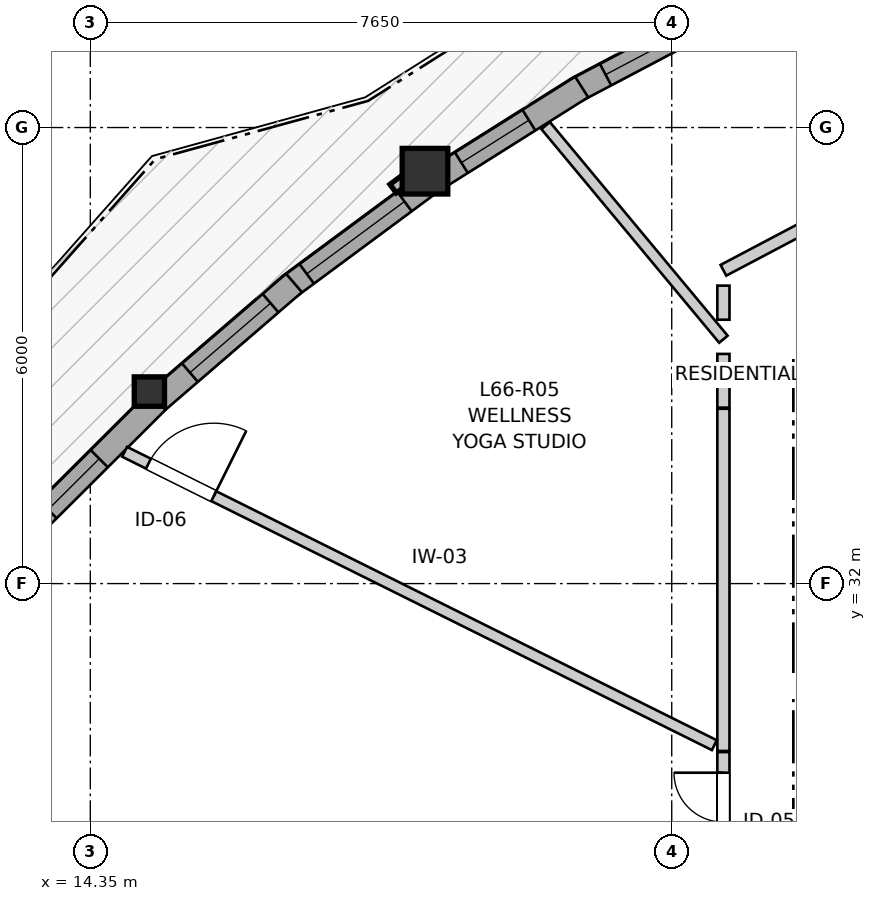
"""IFC4 building model, lengths in metres.
Left out: names, types, materials, properties, quantities, classifications, styles, units other than length and angle.
Written with IfcOpenShell. Run it as: python <this file> out.ifc"""

import sys

from ifc_helpers import new_model, si_unit, direction, frame, frame_2d, origin, origin_2d, place, context, subcontext, project, spatial, rectangle, i_section, extrude, source, transform, mapped, element, fill, save


model = new_model("IFC4")
c1 = context("Model", 3, precision=1e-05, world=origin(), true_north=direction((0.0, 1.0)))
c2 = subcontext(c1, "Body", "Model", "MODEL_VIEW")
j1 = project(units=[si_unit("LENGTHUNIT", "METRE"), si_unit("PLANEANGLEUNIT", "RADIAN")], contexts=[c1])
p1 = place(None, origin())
s1 = spatial("IfcSite", under=j1, at=p1, CompositionType="ELEMENT")
p2 = place(p1, origin())
s2 = spatial("IfcBuilding", under=s1, at=p2, CompositionType="ELEMENT")
p3 = place(p2, frame((0.0, 0.0, 221.2)))
s3 = spatial("IfcBuildingStorey", under=s2, at=p3, CompositionType="ELEMENT", Elevation=221.2)
m1 = source(origin(), c2, "Body", "SweptSolid", [
    extrude(rectangle(XDim=0.6, YDim=0.6, at=origin_2d()), origin(), (0.0, 0.0, 1.0), 2.96),
])
p4 = place(p3, frame((18.753, 37.426, 0.0), z_axis=(0.0, 0.0, 1.0), x_axis=(1.0, 0.0, 0.0)))
e1 = element("IfcColumn", 1, at=p4, inside=s3, PredefinedType="COLUMN", context=c2, shape_type="MappedRepresentation", body=[
    mapped(m1, transform((0.0, 0.0, 0.0), x_axis=(1.0, 0.0, 0.0), y_axis=(0.0, 1.0, 0.0), z_axis=(0.0, 0.0, 1.0), scale=1.0)),
])
m2 = source(origin(), c2, "Body", "SweptSolid", [
    extrude(i_section(OverallWidth=0.398, OverallDepth=0.387, WebThickness=0.019, FlangeThickness=0.03, FilletRadius=0.015, at=origin_2d()), origin(), (0.0, 0.0, 1.0), 2.96),
])
p5 = place(p3, frame((15.127, 34.526, 0.0), z_axis=(0.0, 0.0, 1.0), x_axis=(1.0, 0.0, 0.0)))
e2 = element("IfcColumn", 2, at=p5, inside=s3, PredefinedType="PILASTER", context=c2, shape_type="MappedRepresentation", body=[
    mapped(m2, transform((0.0, 0.0, 0.0), x_axis=(1.0, 0.0, 0.0), y_axis=(0.0, 1.0, 0.0), z_axis=(0.0, 0.0, 1.0), scale=1.0)),
])
p6 = place(p3, frame((22.785, 39.57, 0.0), z_axis=(0.0, 0.0, 1.0), x_axis=(-0.884379914657, -0.466767786541, 0.0)))
e3 = element("IfcWall", 3, at=p6, inside=s3, PredefinedType="SOLIDWALL", context=c2, shape_type="SweptSolid", body=[
    extrude(rectangle(XDim=2.314, YDim=0.32, at=frame_2d((1.157, 0.0))), origin(), (0.0, 0.0, 1.0), 2.58),
])
p7 = place(p6, frame((0.422, 0.0, 0.82)))
e4 = element("IfcOpeningElement", 4, at=p7, cuts=e3, PredefinedType="OPENING", context=c2, shape_type="SweptSolid", body=[
    extrude(rectangle(XDim=1.45, YDim=1.25, at=frame_2d((0.725, 0.625))), frame((0.0, 0.17, 0.0), z_axis=(0.0, -1.0, 0.0), x_axis=(1.0, 0.0, 0.0)), (0.0, 0.0, 1.0), 0.34),
])
p8 = place(p3, frame((20.815, 38.533, 0.0), z_axis=(0.0, 0.0, 1.0), x_axis=(-0.846418054627, -0.532518991963, 0.0)))
e5 = element("IfcWall", 5, at=p8, inside=s3, PredefinedType="SOLIDWALL", context=c2, shape_type="SweptSolid", body=[
    extrude(rectangle(XDim=2.245, YDim=0.32, at=frame_2d((1.122, 0.0))), origin(), (0.0, 0.0, 1.0), 2.58),
])
p9 = place(p8, frame((0.82, 0.0, 0.82)))
e6 = element("IfcOpeningElement", 6, at=p9, cuts=e5, PredefinedType="OPENING", context=c2, shape_type="SweptSolid", body=[
    extrude(rectangle(XDim=1.05, YDim=1.45, at=frame_2d((0.525, 0.725))), frame((0.0, 0.17, 0.0), z_axis=(0.0, -1.0, 0.0), x_axis=(1.0, 0.0, 0.0)), (0.0, 0.0, 1.0), 0.34),
])
p10 = place(p3, frame((18.776, 37.243, 0.0), z_axis=(0.0, 0.0, 1.0), x_axis=(-0.803798468353, -0.594901691267, 0.0)))
e7 = element("IfcWall", 7, at=p10, inside=s3, PredefinedType="SOLIDWALL", context=c2, shape_type="SweptSolid", body=[
    extrude(rectangle(XDim=2.258, YDim=0.32, at=frame_2d((1.129, 0.0))), origin(), (0.0, 0.0, 1.0), 2.58),
])
p11 = place(p10, frame((0.364, 0.0, 0.82)))
e8 = element("IfcOpeningElement", 8, at=p11, cuts=e7, PredefinedType="OPENING", context=c2, shape_type="SweptSolid", body=[
    extrude(rectangle(XDim=1.6, YDim=1.35, at=frame_2d((0.8, 0.675))), frame((0.0, 0.17, 0.0), z_axis=(0.0, -1.0, 0.0), x_axis=(1.0, 0.0, 0.0)), (0.0, 0.0, 1.0), 0.34),
])
p12 = place(p3, frame((17.03, 35.955, 0.0), z_axis=(0.0, 0.0, 1.0), x_axis=(-0.757489541562, -0.652847297937, 0.0)))
e9 = element("IfcWall", 9, at=p12, inside=s3, PredefinedType="SOLIDWALL", context=c2, shape_type="SweptSolid", body=[
    extrude(rectangle(XDim=2.354, YDim=0.32, at=frame_2d((1.177, 0.0))), origin(), (0.0, 0.0, 1.0), 2.58),
])
p13 = place(p12, frame((0.407, 0.0, 0.82)))
e10 = element("IfcOpeningElement", 10, at=p13, cuts=e9, PredefinedType="OPENING", context=c2, shape_type="SweptSolid", body=[
    extrude(rectangle(XDim=1.4, YDim=1.35, at=frame_2d((0.7, 0.675))), frame((0.0, 0.17, 0.0), z_axis=(0.0, -1.0, 0.0), x_axis=(1.0, 0.0, 0.0)), (0.0, 0.0, 1.0), 0.34),
])
p14 = place(p3, frame((15.226, 34.399, 0.0), z_axis=(0.0, 0.0, 1.0), x_axis=(-0.708431997636, -0.705779076429, 0.0)))
e11 = element("IfcWall", 11, at=p14, inside=s3, PredefinedType="SOLIDWALL", context=c2, shape_type="SweptSolid", body=[
    extrude(rectangle(XDim=2.393, YDim=0.32, at=frame_2d((1.196, 0.0))), origin(), (0.0, 0.0, 1.0), 2.58),
])
p15 = place(p14, frame((1.07, 0.0, 0.82)))
e12 = element("IfcOpeningElement", 12, at=p15, cuts=e11, PredefinedType="OPENING", context=c2, shape_type="SweptSolid", body=[
    extrude(rectangle(XDim=0.95, YDim=1.35, at=frame_2d((0.475, 0.675))), frame((0.0, 0.17, 0.0), z_axis=(0.0, -1.0, 0.0), x_axis=(1.0, 0.0, 0.0)), (0.0, 0.0, 1.0), 0.34),
])
p16 = place(p3, frame((22.68, 29.798, 0.0), z_axis=(0.0, 0.0, 1.0), x_axis=(0.0, 1.0, 0.0)))
e13 = element("IfcWall", 13, at=p16, inside=s3, PredefinedType="PARTITIONING", context=c2, shape_type="SweptSolid", body=[
    extrude(rectangle(XDim=4.502, YDim=0.16, at=frame_2d((2.251, 0.0))), origin(), (0.0, 0.0, 1.0), 2.96),
])
p17 = place(p3, frame((22.68, 27.85, 0.0), z_axis=(0.0, 0.0, 1.0), x_axis=(0.0, 1.0, 0.0)))
e14 = element("IfcWall", 14, at=p17, inside=s3, PredefinedType="PARTITIONING", context=c2, shape_type="SweptSolid", body=[
    extrude(rectangle(XDim=1.933, YDim=0.16, at=frame_2d((0.966, 0.0))), origin(), (0.0, 0.0, 1.0), 2.96),
])
p18 = place(p17, frame((0.362, 0.0, 0.0)))
e15 = element("IfcOpeningElement", 15, at=p18, cuts=e14, PredefinedType="OPENING", context=c2, shape_type="SweptSolid", body=[
    extrude(rectangle(XDim=1.3, YDim=2.1, at=frame_2d((0.65, 1.05))), frame((0.0, 0.09, 0.0), z_axis=(0.0, -1.0, 0.0), x_axis=(1.0, 0.0, 0.0)), (0.0, 0.0, 1.0), 0.18),
])
p19 = place(p3, frame((14.802, 33.734, 0.0), z_axis=(0.0, 0.0, 1.0), x_axis=(0.895354955696, -0.445353234311, 0.0)))
e16 = element("IfcWall", 16, at=p19, inside=s3, PredefinedType="PARTITIONING", context=c2, shape_type="SweptSolid", body=[
    extrude(rectangle(XDim=8.666, YDim=0.145, at=frame_2d((4.333, 0.0))), origin(), (0.0, 0.0, 1.0), 2.96),
])
p20 = place(p19, frame((0.35, 0.0, 0.0)))
e17 = element("IfcOpeningElement", 17, at=p20, cuts=e16, PredefinedType="OPENING", context=c2, shape_type="SweptSolid", body=[
    extrude(rectangle(XDim=0.96, YDim=2.1, at=frame_2d((0.48, 1.05))), frame((0.0, 0.083, 0.0), z_axis=(0.0, -1.0, 0.0), x_axis=(1.0, 0.0, 0.0)), (0.0, 0.0, 1.0), 0.165),
])
p21 = place(p3, frame((20.341, 38.025, 0.0), z_axis=(0.0, 0.0, 1.0), x_axis=(0.639731122463, -0.768598784121, 0.0)))
e18 = element("IfcWall", 18, at=p21, inside=s3, PredefinedType="PARTITIONING", context=c2, shape_type="SweptSolid", body=[
    extrude(rectangle(XDim=3.656, YDim=0.145, at=frame_2d((1.828, 0.0))), origin(), (0.0, 0.0, 1.0), 2.96),
])
p22 = place(p3, frame((22.68, 36.122, 0.0), z_axis=(0.0, 0.0, 1.0), x_axis=(0.884468554818, 0.466599802335, 0.0)))
e19 = element("IfcWall", 19, at=p22, inside=s3, PredefinedType="PARTITIONING", context=c2, shape_type="SweptSolid", body=[
    extrude(rectangle(XDim=1.603, YDim=0.16, at=frame_2d((0.802, 0.0))), origin(), (0.0, 0.0, 1.0), 2.96),
])
p23 = place(p3, frame((22.68, 34.315, 0.0), z_axis=(0.0, 0.0, 1.0), x_axis=(0.0, 1.0, 0.0)))
e20 = element("IfcWall", 20, at=p23, inside=s3, PredefinedType="PARTITIONING", context=c2, shape_type="SweptSolid", body=[
    extrude(rectangle(XDim=0.707, YDim=0.16, at=frame_2d((0.353, 0.0))), origin(), (0.0, 0.0, 1.0), 2.96),
])
p24 = place(p3, frame((22.68, 35.471, 0.0), z_axis=(0.0, 0.0, 1.0), x_axis=(0.0, 1.0, 0.0)))
e21 = element("IfcWall", 21, at=p24, inside=s3, PredefinedType="PARTITIONING", context=c2, shape_type="SweptSolid", body=[
    extrude(rectangle(XDim=0.448, YDim=0.16, at=frame_2d((0.224, 0.0))), origin(), (0.0, 0.0, 1.0), 2.96),
])
m3 = source(origin(), c2, "Body", "SweptSolid", [
    extrude(rectangle(XDim=1.45, YDim=1.25, at=frame_2d((0.725, 0.625))), frame((0.0, 0.03, 0.0), z_axis=(0.0, -1.0, 0.0), x_axis=(1.0, 0.0, 0.0)), (0.0, 0.0, 1.0), 0.06),
])
p25 = place(p7, origin())
e22 = element("IfcWindow", 22, at=p25, inside=s3, PartitioningType="SINGLE_PANEL", PredefinedType="WINDOW", context=c2, shape_type="MappedRepresentation", body=[
    mapped(m3, transform((0.0, 0.0, 0.0), x_axis=(1.0, 0.0, 0.0), y_axis=(0.0, 1.0, 0.0), z_axis=(0.0, 0.0, 1.0), scale=1.0)),
])
fill(e4, e22)
m4 = source(origin(), c2, "Body", "SweptSolid", [
    extrude(rectangle(XDim=1.05, YDim=1.45, at=frame_2d((0.525, 0.725))), frame((0.0, 0.03, 0.0), z_axis=(0.0, -1.0, 0.0), x_axis=(1.0, 0.0, 0.0)), (0.0, 0.0, 1.0), 0.06),
])
p26 = place(p9, origin())
e23 = element("IfcWindow", 23, at=p26, inside=s3, PartitioningType="SINGLE_PANEL", PredefinedType="WINDOW", context=c2, shape_type="MappedRepresentation", body=[
    mapped(m4, transform((0.0, 0.0, 0.0), x_axis=(1.0, 0.0, 0.0), y_axis=(0.0, 1.0, 0.0), z_axis=(0.0, 0.0, 1.0), scale=1.0)),
])
fill(e6, e23)
m5 = source(origin(), c2, "Body", "SweptSolid", [
    extrude(rectangle(XDim=1.6, YDim=1.35, at=frame_2d((0.8, 0.675))), frame((0.0, 0.03, 0.0), z_axis=(0.0, -1.0, 0.0), x_axis=(1.0, 0.0, 0.0)), (0.0, 0.0, 1.0), 0.06),
])
p27 = place(p11, origin())
e24 = element("IfcWindow", 24, at=p27, inside=s3, PartitioningType="SINGLE_PANEL", PredefinedType="WINDOW", context=c2, shape_type="MappedRepresentation", body=[
    mapped(m5, transform((0.0, 0.0, 0.0), x_axis=(1.0, 0.0, 0.0), y_axis=(0.0, 1.0, 0.0), z_axis=(0.0, 0.0, 1.0), scale=1.0)),
])
fill(e8, e24)
m6 = source(origin(), c2, "Body", "SweptSolid", [
    extrude(rectangle(XDim=1.4, YDim=1.35, at=frame_2d((0.7, 0.675))), frame((0.0, 0.03, 0.0), z_axis=(0.0, -1.0, 0.0), x_axis=(1.0, 0.0, 0.0)), (0.0, 0.0, 1.0), 0.06),
])
p28 = place(p13, origin())
e25 = element("IfcWindow", 25, at=p28, inside=s3, PartitioningType="SINGLE_PANEL", PredefinedType="WINDOW", context=c2, shape_type="MappedRepresentation", body=[
    mapped(m6, transform((0.0, 0.0, 0.0), x_axis=(1.0, 0.0, 0.0), y_axis=(0.0, 1.0, 0.0), z_axis=(0.0, 0.0, 1.0), scale=1.0)),
])
fill(e10, e25)
m7 = source(origin(), c2, "Body", "SweptSolid", [
    extrude(rectangle(XDim=0.95, YDim=1.35, at=frame_2d((0.475, 0.675))), frame((0.0, 0.03, 0.0), z_axis=(0.0, -1.0, 0.0), x_axis=(1.0, 0.0, 0.0)), (0.0, 0.0, 1.0), 0.06),
])
p29 = place(p15, origin())
e26 = element("IfcWindow", 26, at=p29, inside=s3, PartitioningType="SINGLE_PANEL", PredefinedType="WINDOW", context=c2, shape_type="MappedRepresentation", body=[
    mapped(m7, transform((0.0, 0.0, 0.0), x_axis=(1.0, 0.0, 0.0), y_axis=(0.0, 1.0, 0.0), z_axis=(0.0, 0.0, 1.0), scale=1.0)),
])
fill(e12, e26)
m8 = source(origin(), c2, "Body", "SweptSolid", [
    extrude(rectangle(XDim=0.96, YDim=2.1, at=frame_2d((0.48, 1.05))), frame((0.0, 0.025, 0.0), z_axis=(0.0, -1.0, 0.0), x_axis=(1.0, 0.0, 0.0)), (0.0, 0.0, 1.0), 0.05),
])
p30 = place(p20, origin())
e27 = element("IfcDoor", 27, at=p30, inside=s3, OperationType="SINGLE_SWING_RIGHT", PredefinedType="DOOR", context=c2, shape_type="MappedRepresentation", body=[
    mapped(m8, transform((0.0, 0.0, 0.0), x_axis=(1.0, 0.0, 0.0), y_axis=(0.0, 1.0, 0.0), z_axis=(0.0, 0.0, 1.0), scale=1.0)),
])
fill(e17, e27)
m9 = source(origin(), c2, "Body", "SweptSolid", [
    extrude(rectangle(XDim=1.3, YDim=2.1, at=frame_2d((0.65, 1.05))), frame((0.0, 0.025, 0.0), z_axis=(0.0, -1.0, 0.0), x_axis=(1.0, 0.0, 0.0)), (0.0, 0.0, 1.0), 0.05),
])
p31 = place(p18, origin())
e28 = element("IfcDoor", 28, at=p31, inside=s3, OperationType="DOUBLE_DOOR_SINGLE_SWING", PredefinedType="DOOR", context=c2, shape_type="MappedRepresentation", body=[
    mapped(m9, transform((0.0, 0.0, 0.0), x_axis=(1.0, 0.0, 0.0), y_axis=(0.0, 1.0, 0.0), z_axis=(0.0, 0.0, 1.0), scale=1.0)),
])
fill(e15, e28)
save(model, sys.argv[1])
